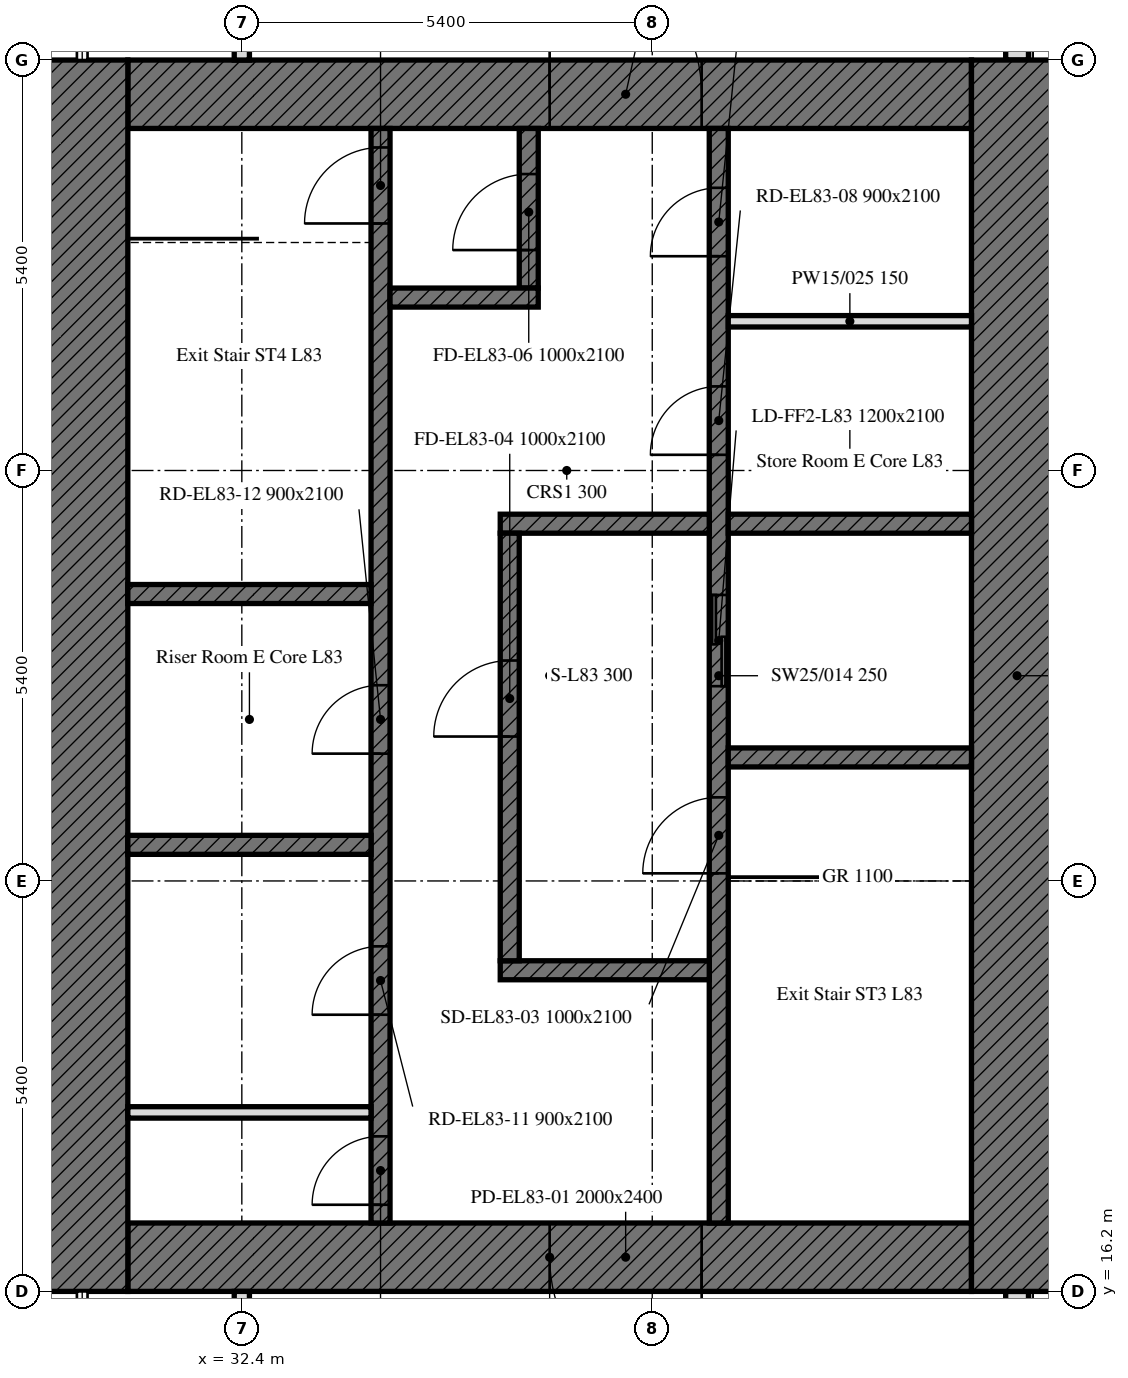
"""IFC4 building model, lengths in metres.
Left out: names, types, materials, properties, quantities, classifications, styles, units other than length and angle.
Written with IfcOpenShell. Run it as: python <this file> out.ifc"""

import sys

from ifc_helpers import new_model, si_unit, direction, frame, frame_2d, origin, place, context, subcontext, project, spatial, polyline, rectangle, outline, extrude, element, fill, save


model = new_model("IFC4")
c1 = context("Model", 3, precision=1e-05, world=origin(), true_north=direction((0.0, 1.0)))
c2 = subcontext(c1, "Body", "Model", "MODEL_VIEW")
j1 = project(units=[si_unit("LENGTHUNIT", "METRE"), si_unit("PLANEANGLEUNIT", "RADIAN")], contexts=[c1])
p1 = place(None, origin())
s1 = spatial("IfcSite", under=j1, at=p1, CompositionType="ELEMENT")
p2 = place(p1, origin())
s2 = spatial("IfcBuilding", under=s1, at=p2, CompositionType="ELEMENT")
p3 = place(p2, frame((0.0, 0.0, 335.2)))
s3 = spatial("IfcBuildingStorey", under=s2, at=p3, CompositionType="ELEMENT", Elevation=335.2)
p4 = place(p3, frame((42.6, 10.986, 0.0), z_axis=(0.0, 0.0, 1.0), x_axis=(0.0, 1.0, 0.0)))
e1 = element("IfcWall", 1, at=p4, inside=s3, PredefinedType="SOLIDWALL", context=c2, shape_type="SweptSolid", body=[
    extrude(outline(polyline([(0.0, 0.0), (5.214, 0.0), (5.214, 8.433), (4.634, 8.433), (4.055, 8.433), (3.476, 8.433), (2.896, 8.433), (2.317, 8.433), (1.738, 8.433), (1.159, 8.433), (0.579, 8.433), (0.0, 8.433), (0.0, 0.0)])), frame((0.0, 0.15, 0.0), z_axis=(0.0, -1.0, 0.0), x_axis=(1.0, 0.0, 0.0)), (0.0, 0.0, 1.0), 0.3),
])
p5 = place(p4, frame((1.014, 0.0, 0.6)))
e2 = element("IfcOpeningElement", 2, at=p5, cuts=e1, PredefinedType="OPENING", context=c2, shape_type="SweptSolid", body=[
    extrude(rectangle(XDim=3.0, YDim=1.8, at=frame_2d((1.5, 0.9))), frame((0.0, 0.16, 0.0), z_axis=(0.0, -1.0, 0.0), x_axis=(1.0, 0.0, 0.0)), (0.0, 0.0, 1.0), 0.32),
])
p6 = place(p3, frame((42.6, 32.4, 0.0), z_axis=(0.0, 0.0, 1.0), x_axis=(0.0, 1.0, 0.0)))
e3 = element("IfcWall", 3, at=p6, inside=s3, PredefinedType="SOLIDWALL", context=c2, shape_type="SweptSolid", body=[
    extrude(outline(polyline([(0.0, 0.0), (10.614, 0.0), (10.614, 8.433), (10.024, 8.433), (9.434, 8.433), (8.845, 8.433), (8.255, 8.433), (7.665, 8.433), (7.076, 8.433), (6.486, 8.433), (5.896, 8.433), (5.307, 8.433), (4.717, 8.433), (4.127, 8.433), (3.538, 8.433), (2.948, 8.433), (2.359, 8.433), (1.769, 8.433), (1.179, 8.433), (0.59, 8.433), (0.0, 8.433), (0.0, 0.0)])), frame((0.0, 0.15, 0.0), z_axis=(0.0, -1.0, 0.0), x_axis=(1.0, 0.0, 0.0)), (0.0, 0.0, 1.0), 0.3),
])
p7 = place(p6, frame((1.2, 0.0, 0.6)))
e4 = element("IfcOpeningElement", 4, at=p7, cuts=e3, PredefinedType="OPENING", context=c2, shape_type="SweptSolid", body=[
    extrude(rectangle(XDim=3.0, YDim=1.8, at=frame_2d((1.5, 0.9))), frame((0.0, 0.16, 0.0), z_axis=(0.0, -1.0, 0.0), x_axis=(1.0, 0.0, 0.0)), (0.0, 0.0, 1.0), 0.32),
])
p8 = place(p6, frame((7.396, 0.0, 0.6)))
e5 = element("IfcOpeningElement", 5, at=p8, cuts=e3, PredefinedType="OPENING", context=c2, shape_type="SweptSolid", body=[
    extrude(rectangle(XDim=1.4, YDim=1.8, at=frame_2d((0.7, 0.9))), frame((0.0, 0.16, 0.0), z_axis=(0.0, -1.0, 0.0), x_axis=(1.0, 0.0, 0.0)), (0.0, 0.0, 1.0), 0.32),
])
p9 = place(p3, frame((42.0, 16.65, 0.0), z_axis=(0.0, 0.0, 1.0), x_axis=(-1.0, 0.0, 0.0)))
e6 = element("IfcWall", 6, at=p9, inside=s3, PredefinedType="SOLIDWALL", context=c2, shape_type="SweptSolid", body=[
    extrude(outline(polyline([(0.0, 0.0), (11.1, 0.0), (11.1, 3.233), (0.0, 8.167), (0.0, 0.0)])), frame((0.0, 0.45, 0.0), z_axis=(0.0, -1.0, 0.0), x_axis=(1.0, 0.0, 0.0)), (0.0, 0.0, 1.0), 0.9),
])
p10 = place(p9, frame((3.55, 0.0, 0.0)))
e7 = element("IfcOpeningElement", 7, at=p10, cuts=e6, PredefinedType="OPENING", context=c2, shape_type="SweptSolid", body=[
    extrude(rectangle(XDim=2.0, YDim=2.4, at=frame_2d((1.0, 1.2))), frame((0.0, 0.45, 0.0), z_axis=(0.0, -1.0, 0.0), x_axis=(1.0, 0.0, 0.0)), (0.0, 0.0, 1.0), 0.9),
])
p11 = place(p3, frame((30.9, 31.95, 0.0), z_axis=(0.0, 0.0, 1.0), x_axis=(1.0, 0.0, 0.0)))
e8 = element("IfcWall", 8, at=p11, inside=s3, PredefinedType="SOLIDWALL", context=c2, shape_type="SweptSolid", body=[
    extrude(outline(polyline([(0.0, 0.0), (11.1, 0.0), (11.1, 8.167), (0.0, 3.233), (0.0, 0.0)])), frame((0.0, 0.45, 0.0), z_axis=(0.0, -1.0, 0.0), x_axis=(1.0, 0.0, 0.0)), (0.0, 0.0, 1.0), 0.9),
])
p12 = place(p11, frame((5.55, 0.0, 0.0)))
e9 = element("IfcOpeningElement", 9, at=p12, cuts=e8, PredefinedType="OPENING", context=c2, shape_type="SweptSolid", body=[
    extrude(rectangle(XDim=2.0, YDim=2.4, at=frame_2d((1.0, 1.2))), frame((0.0, 0.45, 0.0), z_axis=(0.0, -1.0, 0.0), x_axis=(1.0, 0.0, 0.0)), (0.0, 0.0, 1.0), 0.9),
])
p13 = place(p3, frame((42.6, 32.4, 0.0), z_axis=(0.0, 0.0, 1.0), x_axis=(0.0, -1.0, 0.0)))
e10 = element("IfcWall", 10, at=p13, inside=s3, PredefinedType="SOLIDWALL", context=c2, shape_type="SweptSolid", body=[
    extrude(rectangle(XDim=16.2, YDim=1.2, at=frame_2d((8.1, 0.0))), origin(), (0.0, 0.0, 1.0), 8.433),
])
p14 = place(p3, frame((30.3, 16.2, 0.0), z_axis=(0.0, 0.0, 1.0), x_axis=(0.0, 1.0, 0.0)))
e11 = element("IfcWall", 11, at=p14, inside=s3, PredefinedType="SOLIDWALL", context=c2, shape_type="SweptSolid", body=[
    extrude(rectangle(XDim=16.2, YDim=1.2, at=frame_2d((8.1, 0.0))), origin(), (0.0, 0.0, 1.0), 2.967),
])
p15 = place(p3, frame((38.675, 17.1, 0.0), z_axis=(0.0, 0.0, 1.0), x_axis=(0.0, 1.0, 0.0)))
e12 = element("IfcWall", 12, at=p15, inside=s3, PredefinedType="SOLIDWALL", context=c2, shape_type="SweptSolid", body=[
    extrude(rectangle(XDim=14.4, YDim=0.25, at=frame_2d((7.2, 0.0))), origin(), (0.0, 0.0, 1.0), 6.689),
])
p16 = place(p15, frame((4.6, 0.0, 0.0)))
e13 = element("IfcOpeningElement", 13, at=p16, cuts=e12, PredefinedType="OPENING", context=c2, shape_type="SweptSolid", body=[
    extrude(rectangle(XDim=1.0, YDim=2.1, at=frame_2d((0.5, 1.05))), frame((0.0, 0.125, 0.0), z_axis=(0.0, -1.0, 0.0), x_axis=(1.0, 0.0, 0.0)), (0.0, 0.0, 1.0), 0.25),
])
p17 = place(p15, frame((7.062, 0.0, 0.0)))
e14 = element("IfcOpeningElement", 14, at=p17, cuts=e12, PredefinedType="OPENING", context=c2, shape_type="SweptSolid", body=[
    extrude(rectangle(XDim=1.2, YDim=2.1, at=frame_2d((0.6, 1.05))), frame((0.0, 0.125, 0.0), z_axis=(0.0, -1.0, 0.0), x_axis=(1.0, 0.0, 0.0)), (0.0, 0.0, 1.0), 0.25),
])
p18 = place(p15, frame((10.106, 0.0, 0.0)))
e15 = element("IfcOpeningElement", 15, at=p18, cuts=e12, PredefinedType="OPENING", context=c2, shape_type="SweptSolid", body=[
    extrude(rectangle(XDim=0.9, YDim=2.1, at=frame_2d((0.45, 1.05))), frame((0.0, 0.125, 0.0), z_axis=(0.0, -1.0, 0.0), x_axis=(1.0, 0.0, 0.0)), (0.0, 0.0, 1.0), 0.25),
])
p19 = place(p15, frame((12.719, 0.0, 0.0)))
e16 = element("IfcOpeningElement", 16, at=p19, cuts=e12, PredefinedType="OPENING", context=c2, shape_type="SweptSolid", body=[
    extrude(rectangle(XDim=0.9, YDim=2.1, at=frame_2d((0.45, 1.05))), frame((0.0, 0.125, 0.0), z_axis=(0.0, -1.0, 0.0), x_axis=(1.0, 0.0, 0.0)), (0.0, 0.0, 1.0), 0.25),
])
p20 = place(p3, frame((34.225, 17.1, 0.0), z_axis=(0.0, 0.0, 1.0), x_axis=(0.0, 1.0, 0.0)))
e17 = element("IfcWall", 17, at=p20, inside=s3, PredefinedType="SOLIDWALL", context=c2, shape_type="SweptSolid", body=[
    extrude(rectangle(XDim=14.4, YDim=0.25, at=frame_2d((7.2, 0.0))), origin(), (0.0, 0.0, 1.0), 4.711),
])
p21 = place(p20, frame((13.15, 0.0, 0.0)))
e18 = element("IfcOpeningElement", 18, at=p21, cuts=e17, PredefinedType="OPENING", context=c2, shape_type="SweptSolid", body=[
    extrude(rectangle(XDim=1.0, YDim=2.1, at=frame_2d((0.5, 1.05))), frame((0.0, 0.125, 0.0), z_axis=(0.0, -1.0, 0.0), x_axis=(1.0, 0.0, 0.0)), (0.0, 0.0, 1.0), 0.25),
])
p22 = place(p20, frame((0.24, 0.0, 0.0)))
e19 = element("IfcOpeningElement", 19, at=p22, cuts=e17, PredefinedType="OPENING", context=c2, shape_type="SweptSolid", body=[
    extrude(rectangle(XDim=0.9, YDim=2.1, at=frame_2d((0.45, 1.05))), frame((0.0, 0.125, 0.0), z_axis=(0.0, -1.0, 0.0), x_axis=(1.0, 0.0, 0.0)), (0.0, 0.0, 1.0), 0.25),
])
p23 = place(p20, frame((2.74, 0.0, 0.0)))
e20 = element("IfcOpeningElement", 20, at=p23, cuts=e17, PredefinedType="OPENING", context=c2, shape_type="SweptSolid", body=[
    extrude(rectangle(XDim=0.9, YDim=2.1, at=frame_2d((0.45, 1.05))), frame((0.0, 0.125, 0.0), z_axis=(0.0, -1.0, 0.0), x_axis=(1.0, 0.0, 0.0)), (0.0, 0.0, 1.0), 0.25),
])
p24 = place(p20, frame((6.175, 0.0, 0.0)))
e21 = element("IfcOpeningElement", 21, at=p24, cuts=e17, PredefinedType="OPENING", context=c2, shape_type="SweptSolid", body=[
    extrude(rectangle(XDim=0.9, YDim=2.1, at=frame_2d((0.45, 1.05))), frame((0.0, 0.125, 0.0), z_axis=(0.0, -1.0, 0.0), x_axis=(1.0, 0.0, 0.0)), (0.0, 0.0, 1.0), 0.25),
])
p25 = place(p3, frame((38.8, 23.225, 0.0), z_axis=(0.0, 0.0, 1.0), x_axis=(1.0, 0.0, 0.0)))
e22 = element("IfcWall", 22, at=p25, inside=s3, PredefinedType="SOLIDWALL", context=c2, shape_type="SweptSolid", body=[
    extrude(outline(polyline([(0.0, 0.0), (3.2, 0.0), (3.2, 8.167), (0.0, 6.744), (0.0, 0.0)])), frame((0.0, 0.125, 0.0), z_axis=(0.0, -1.0, 0.0), x_axis=(1.0, 0.0, 0.0)), (0.0, 0.0, 1.0), 0.25),
])
for number, where, z_axis, x_axis in (
    (23, (30.9, 25.375, 0.0), (0.0, 0.0, 1.0), (1.0, 0.0, 0.0)),
    (24, (30.9, 22.075, 0.0), (0.0, 0.0, 1.0), (1.0, 0.0, 0.0)),
):
    element("IfcWall", number, at=place(p3, frame(where, z_axis=z_axis, x_axis=x_axis)), inside=s3, PredefinedType="SOLIDWALL", context=c2, shape_type="SweptSolid", body=[
        extrude(outline(polyline([(0.0, 0.0), (3.2, 0.0), (3.2, 4.656), (0.0, 3.233), (0.0, 0.0)])), frame((0.0, 0.125, 0.0), z_axis=(0.0, -1.0, 0.0), x_axis=(1.0, 0.0, 0.0)), (0.0, 0.0, 1.0), 0.25),
    ])
p26 = place(p3, frame((38.8, 26.3, 0.0), z_axis=(0.0, 0.0, 1.0), x_axis=(1.0, 0.0, 0.0)))
e25 = element("IfcWall", 25, at=p26, inside=s3, PredefinedType="SOLIDWALL", context=c2, shape_type="SweptSolid", body=[
    extrude(outline(polyline([(0.0, 0.0), (3.2, 0.0), (3.2, 8.167), (0.0, 6.744), (0.0, 0.0)])), frame((0.0, 0.125, 0.0), z_axis=(0.0, -1.0, 0.0), x_axis=(1.0, 0.0, 0.0)), (0.0, 0.0, 1.0), 0.25),
])
for number, where, z_axis, x_axis in (
    (26, (35.8, 26.3, 0.0), (0.0, 0.0, 1.0), (1.0, 0.0, 0.0)),
    (27, (35.8, 20.425, 0.0), (0.0, 0.0, 1.0), (1.0, 0.0, 0.0)),
):
    element("IfcWall", number, at=place(p3, frame(where, z_axis=z_axis, x_axis=x_axis)), inside=s3, PredefinedType="SOLIDWALL", context=c2, shape_type="SweptSolid", body=[
        extrude(outline(polyline([(0.0, 0.0), (2.75, 0.0), (2.75, 6.633), (0.0, 5.411), (0.0, 0.0)])), frame((0.0, 0.125, 0.0), z_axis=(0.0, -1.0, 0.0), x_axis=(1.0, 0.0, 0.0)), (0.0, 0.0, 1.0), 0.25),
    ])
p27 = place(p3, frame((36.175, 29.4, 0.0), z_axis=(0.0, 0.0, 1.0), x_axis=(0.0, 1.0, 0.0)))
e28 = element("IfcWall", 28, at=p27, inside=s3, PredefinedType="SOLIDWALL", context=c2, shape_type="SweptSolid", body=[
    extrude(rectangle(XDim=2.1, YDim=0.25, at=frame_2d((1.05, 0.0))), origin(), (0.0, 0.0, 1.0), 5.578),
])
p28 = place(p27, frame((0.5, 0.0, 0.0)))
e29 = element("IfcOpeningElement", 29, at=p28, cuts=e28, PredefinedType="OPENING", context=c2, shape_type="SweptSolid", body=[
    extrude(rectangle(XDim=1.0, YDim=2.1, at=frame_2d((0.5, 1.05))), frame((0.0, 0.125, 0.0), z_axis=(0.0, -1.0, 0.0), x_axis=(1.0, 0.0, 0.0)), (0.0, 0.0, 1.0), 0.25),
])
p29 = place(p3, frame((34.35, 29.275, 0.0), z_axis=(0.0, 0.0, 1.0), x_axis=(1.0, 0.0, 0.0)))
e30 = element("IfcWall", 30, at=p29, inside=s3, PredefinedType="SOLIDWALL", context=c2, shape_type="SweptSolid", body=[
    extrude(outline(polyline([(0.0, 0.0), (1.95, 0.0), (1.95, 5.633), (0.0, 4.767), (0.0, 0.0)])), frame((0.0, 0.125, 0.0), z_axis=(0.0, -1.0, 0.0), x_axis=(1.0, 0.0, 0.0)), (0.0, 0.0, 1.0), 0.25),
])
p30 = place(p3, frame((35.925, 20.55, 0.0), z_axis=(0.0, 0.0, 1.0), x_axis=(0.0, 1.0, 0.0)))
e31 = element("IfcWall", 31, at=p30, inside=s3, PredefinedType="SOLIDWALL", context=c2, shape_type="SweptSolid", body=[
    extrude(rectangle(XDim=5.625, YDim=0.25, at=frame_2d((2.812, 0.0))), origin(), (0.0, 0.0, 1.0), 5.467),
])
p31 = place(p30, frame((2.95, 0.0, 0.0)))
e32 = element("IfcOpeningElement", 32, at=p31, cuts=e31, PredefinedType="OPENING", context=c2, shape_type="SweptSolid", body=[
    extrude(rectangle(XDim=1.0, YDim=2.1, at=frame_2d((0.5, 1.05))), frame((0.0, 0.125, 0.0), z_axis=(0.0, -1.0, 0.0), x_axis=(1.0, 0.0, 0.0)), (0.0, 0.0, 1.0), 0.25),
])
p32 = place(p3, frame((38.8, 28.963, 0.0), z_axis=(0.0, 0.0, 1.0), x_axis=(1.0, 0.0, 0.0)))
e33 = element("IfcWall", 33, at=p32, inside=s3, PredefinedType="PARTITIONING", context=c2, shape_type="SweptSolid", body=[
    extrude(outline(polyline([(0.0, 0.0), (3.2, 0.0), (3.2, 8.167), (0.0, 6.744), (0.0, 0.0)])), frame((0.0, 0.075, 0.0), z_axis=(0.0, -1.0, 0.0), x_axis=(1.0, 0.0, 0.0)), (0.0, 0.0, 1.0), 0.15),
])
p33 = place(p3, frame((30.9, 18.555, 0.0), z_axis=(0.0, 0.0, 1.0), x_axis=(1.0, 0.0, 0.0)))
e34 = element("IfcWall", 34, at=p33, inside=s3, PredefinedType="PARTITIONING", context=c2, shape_type="SweptSolid", body=[
    extrude(outline(polyline([(0.0, 0.0), (3.2, 0.0), (3.2, 4.656), (0.0, 3.233), (0.0, 0.0)])), frame((0.0, 0.075, 0.0), z_axis=(0.0, -1.0, 0.0), x_axis=(1.0, 0.0, 0.0)), (0.0, 0.0, 1.0), 0.15),
])
p34 = place(p3, frame((32.4, 32.4, 0.0), z_axis=(0.0, 0.0, 1.0), x_axis=(0.0, 1.0, 0.0)))
e35 = element("IfcWall", 35, at=p34, inside=s3, PredefinedType="PARTITIONING", context=c2, shape_type="SweptSolid", body=[
    extrude(rectangle(XDim=5.024, YDim=0.2, at=frame_2d((2.512, 0.0))), origin(), (0.0, 0.0, 1.0), 3.9),
])
p35 = place(p3, frame((32.4, 13.15, 0.0), z_axis=(0.0, 0.0, 1.0), x_axis=(0.0, 1.0, 0.0)))
e36 = element("IfcWall", 36, at=p35, inside=s3, PredefinedType="PARTITIONING", context=c2, shape_type="SweptSolid", body=[
    extrude(rectangle(XDim=3.05, YDim=0.2, at=frame_2d((1.525, 0.0))), origin(), (0.0, 0.0, 1.0), 3.9),
])
p36 = place(p10, origin())
e37 = element("IfcDoor", 37, at=p36, inside=s3, OperationType="DOUBLE_DOOR_SINGLE_SWING", PredefinedType="DOOR", context=c2, shape_type="SweptSolid", body=[
    extrude(rectangle(XDim=2.0, YDim=2.4, at=frame_2d((1.0, 1.2))), frame((0.0, 0.025, 0.0), z_axis=(0.0, -1.0, 0.0), x_axis=(1.0, 0.0, 0.0)), (0.0, 0.0, 1.0), 0.05),
])
fill(e7, e37)
p37 = place(p12, origin())
e38 = element("IfcDoor", 38, at=p37, inside=s3, OperationType="DOUBLE_DOOR_SINGLE_SWING", PredefinedType="DOOR", context=c2, shape_type="SweptSolid", body=[
    extrude(rectangle(XDim=2.0, YDim=2.4, at=frame_2d((1.0, 1.2))), frame((0.0, 0.025, 0.0), z_axis=(0.0, -1.0, 0.0), x_axis=(1.0, 0.0, 0.0)), (0.0, 0.0, 1.0), 0.05),
])
fill(e9, e38)
p38 = place(p16, origin())
e39 = element("IfcDoor", 39, at=p38, inside=s3, OperationType="SINGLE_SWING_LEFT", PredefinedType="DOOR", context=c2, shape_type="SweptSolid", body=[
    extrude(rectangle(XDim=1.0, YDim=2.1, at=frame_2d((0.5, 1.05))), frame((0.0, 0.025, 0.0), z_axis=(0.0, -1.0, 0.0), x_axis=(1.0, 0.0, 0.0)), (0.0, 0.0, 1.0), 0.05),
])
fill(e13, e39)
p39 = place(p31, origin())
e40 = element("IfcDoor", 40, at=p39, inside=s3, OperationType="SINGLE_SWING_LEFT", PredefinedType="DOOR", context=c2, shape_type="SweptSolid", body=[
    extrude(rectangle(XDim=1.0, YDim=2.1, at=frame_2d((0.5, 1.05))), frame((0.0, 0.025, 0.0), z_axis=(0.0, -1.0, 0.0), x_axis=(1.0, 0.0, 0.0)), (0.0, 0.0, 1.0), 0.05),
])
fill(e32, e40)
p40 = place(p21, origin())
e41 = element("IfcDoor", 41, at=p40, inside=s3, OperationType="SINGLE_SWING_LEFT", PredefinedType="DOOR", context=c2, shape_type="SweptSolid", body=[
    extrude(rectangle(XDim=1.0, YDim=2.1, at=frame_2d((0.5, 1.05))), frame((0.0, 0.025, 0.0), z_axis=(0.0, -1.0, 0.0), x_axis=(1.0, 0.0, 0.0)), (0.0, 0.0, 1.0), 0.05),
])
fill(e18, e41)
p41 = place(p28, origin())
e42 = element("IfcDoor", 42, at=p41, inside=s3, OperationType="SINGLE_SWING_LEFT", PredefinedType="DOOR", context=c2, shape_type="SweptSolid", body=[
    extrude(rectangle(XDim=1.0, YDim=2.1, at=frame_2d((0.5, 1.05))), frame((0.0, 0.025, 0.0), z_axis=(0.0, -1.0, 0.0), x_axis=(1.0, 0.0, 0.0)), (0.0, 0.0, 1.0), 0.05),
])
fill(e29, e42)
p42 = place(p17, origin())
e43 = element("IfcDoor", 43, at=p42, inside=s3, OperationType="DOUBLE_DOOR_SLIDING", PredefinedType="DOOR", context=c2, shape_type="SweptSolid", body=[
    extrude(rectangle(XDim=1.2, YDim=2.1, at=frame_2d((0.6, 1.05))), frame((0.0, 0.025, 0.0), z_axis=(0.0, -1.0, 0.0), x_axis=(1.0, 0.0, 0.0)), (0.0, 0.0, 1.0), 0.05),
])
fill(e14, e43)
p43 = place(p18, origin())
e44 = element("IfcDoor", 44, at=p43, inside=s3, OperationType="SINGLE_SWING_LEFT", PredefinedType="DOOR", context=c2, shape_type="SweptSolid", body=[
    extrude(rectangle(XDim=0.9, YDim=2.1, at=frame_2d((0.45, 1.05))), frame((0.0, 0.025, 0.0), z_axis=(0.0, -1.0, 0.0), x_axis=(1.0, 0.0, 0.0)), (0.0, 0.0, 1.0), 0.05),
])
fill(e15, e44)
p44 = place(p19, origin())
e45 = element("IfcDoor", 45, at=p44, inside=s3, OperationType="SINGLE_SWING_LEFT", PredefinedType="DOOR", context=c2, shape_type="SweptSolid", body=[
    extrude(rectangle(XDim=0.9, YDim=2.1, at=frame_2d((0.45, 1.05))), frame((0.0, 0.025, 0.0), z_axis=(0.0, -1.0, 0.0), x_axis=(1.0, 0.0, 0.0)), (0.0, 0.0, 1.0), 0.05),
])
fill(e16, e45)
p45 = place(p22, origin())
e46 = element("IfcDoor", 46, at=p45, inside=s3, OperationType="SINGLE_SWING_LEFT", PredefinedType="DOOR", context=c2, shape_type="SweptSolid", body=[
    extrude(rectangle(XDim=0.9, YDim=2.1, at=frame_2d((0.45, 1.05))), frame((0.0, 0.025, 0.0), z_axis=(0.0, -1.0, 0.0), x_axis=(1.0, 0.0, 0.0)), (0.0, 0.0, 1.0), 0.05),
])
fill(e19, e46)
p46 = place(p23, origin())
e47 = element("IfcDoor", 47, at=p46, inside=s3, OperationType="SINGLE_SWING_LEFT", PredefinedType="DOOR", context=c2, shape_type="SweptSolid", body=[
    extrude(rectangle(XDim=0.9, YDim=2.1, at=frame_2d((0.45, 1.05))), frame((0.0, 0.025, 0.0), z_axis=(0.0, -1.0, 0.0), x_axis=(1.0, 0.0, 0.0)), (0.0, 0.0, 1.0), 0.05),
])
fill(e20, e47)
p47 = place(p24, origin())
e48 = element("IfcDoor", 48, at=p47, inside=s3, OperationType="SINGLE_SWING_LEFT", PredefinedType="DOOR", context=c2, shape_type="SweptSolid", body=[
    extrude(rectangle(XDim=0.9, YDim=2.1, at=frame_2d((0.45, 1.05))), frame((0.0, 0.025, 0.0), z_axis=(0.0, -1.0, 0.0), x_axis=(1.0, 0.0, 0.0)), (0.0, 0.0, 1.0), 0.05),
])
fill(e21, e48)
save(model, sys.argv[1])
